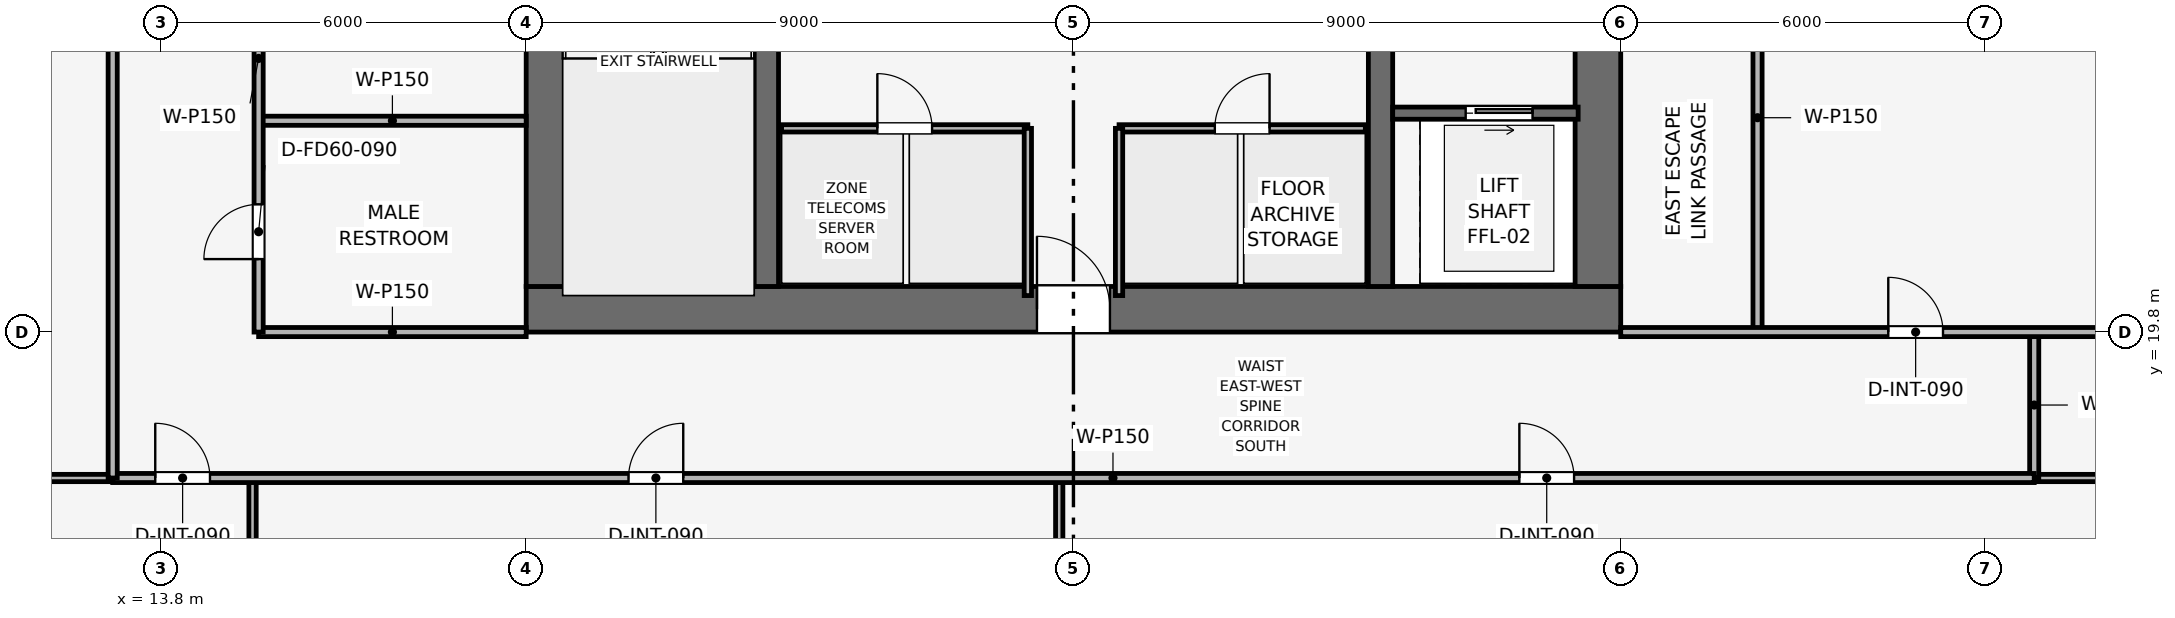
"""IFC4 building model, lengths in metres.
Left out: names, types, materials, properties, quantities, classifications, styles, units other than length and angle.
Written with IfcOpenShell. Run it as: python <this file> out.ifc"""

import sys

from ifc_helpers import new_model, si_unit, direction, frame, frame_2d, origin, place, context, subcontext, project, spatial, rectangle, extrude, element, fill, save


model = new_model("IFC4")
c1 = context("Model", 3, precision=1e-05, world=origin(), true_north=direction((0.0, 1.0)))
c2 = subcontext(c1, "Body", "Model", "MODEL_VIEW")
j1 = project(units=[si_unit("LENGTHUNIT", "METRE"), si_unit("PLANEANGLEUNIT", "RADIAN")], contexts=[c1])
p1 = place(None, origin())
s1 = spatial("IfcSite", under=j1, at=p1, CompositionType="ELEMENT")
p2 = place(p1, origin())
s2 = spatial("IfcBuilding", under=s1, at=p2, CompositionType="ELEMENT")
p3 = place(p2, frame((0.0, 0.0, 211.2)))
s3 = spatial("IfcBuildingStorey", under=s2, at=p3, CompositionType="ELEMENT", Elevation=211.2)
p4 = place(p3, frame((19.8, 20.175, 0.0), z_axis=(0.0, 0.0, 1.0), x_axis=(1.0, 0.0, 0.0)))
e1 = element("IfcWall", 1, at=p4, inside=s3, PredefinedType="SHEAR", context=c2, shape_type="SweptSolid", body=[
    extrude(rectangle(XDim=18.0, YDim=0.75, at=frame_2d((9.0, 0.0))), origin(), (0.0, 0.0, 1.0), 3.75),
])
p5 = place(p4, frame((8.4, 0.0, 0.0)))
e2 = element("IfcOpeningElement", 2, at=p5, cuts=e1, PredefinedType="OPENING", context=c2, shape_type="SweptSolid", body=[
    extrude(rectangle(XDim=1.2, YDim=2.2, at=frame_2d((0.6, 1.1))), frame((0.0, 0.385, 0.0), z_axis=(0.0, -1.0, 0.0), x_axis=(1.0, 0.0, 0.0)), (0.0, 0.0, 1.0), 0.77),
])
p6 = place(p3, frame((20.175, 20.55, 0.0), z_axis=(0.0, 0.0, 1.0), x_axis=(0.0, 1.0, 0.0)))
e3 = element("IfcWall", 3, at=p6, inside=s3, PredefinedType="SHEAR", context=c2, shape_type="SweptSolid", body=[
    extrude(rectangle(XDim=16.5, YDim=0.75, at=frame_2d((8.25, 0.0))), origin(), (0.0, 0.0, 1.0), 3.75),
])
p7 = place(p6, frame((10.25, 0.0, 0.0)))
e4 = element("IfcOpeningElement", 4, at=p7, cuts=e3, PredefinedType="OPENING", context=c2, shape_type="SweptSolid", body=[
    extrude(rectangle(XDim=1.1, YDim=2.15, at=frame_2d((0.55, 1.075))), frame((0.0, 0.385, 0.0), z_axis=(0.0, -1.0, 0.0), x_axis=(1.0, 0.0, 0.0)), (0.0, 0.0, 1.0), 0.77),
])
p8 = place(p3, frame((37.425, 20.55, 0.0), z_axis=(0.0, 0.0, 1.0), x_axis=(0.0, 1.0, 0.0)))
e5 = element("IfcWall", 5, at=p8, inside=s3, PredefinedType="SHEAR", context=c2, shape_type="SweptSolid", body=[
    extrude(rectangle(XDim=16.5, YDim=0.75, at=frame_2d((8.25, 0.0))), origin(), (0.0, 0.0, 1.0), 3.75),
])
p9 = place(p8, frame((4.75, 0.0, 0.0)))
e6 = element("IfcOpeningElement", 6, at=p9, cuts=e5, PredefinedType="OPENING", context=c2, shape_type="SweptSolid", body=[
    extrude(rectangle(XDim=1.1, YDim=2.15, at=frame_2d((0.55, 1.075))), frame((0.0, 0.385, 0.0), z_axis=(0.0, -1.0, 0.0), x_axis=(1.0, 0.0, 0.0)), (0.0, 0.0, 1.0), 0.77),
])
for number, where, z_axis, x_axis in (
    (7, (23.75, 20.55, 0.0), (0.0, 0.0, 1.0), (0.0, 1.0, 0.0)),
    (8, (33.85, 20.55, 0.0), (0.0, 0.0, 1.0), (0.0, 1.0, 0.0)),
):
    element("IfcWall", number, at=place(p3, frame(where, z_axis=z_axis, x_axis=x_axis)), inside=s3, PredefinedType="SHEAR", context=c2, shape_type="SweptSolid", body=[
        extrude(rectangle(XDim=16.5, YDim=0.4, at=frame_2d((8.25, 0.0))), origin(), (0.0, 0.0, 1.0), 3.75),
    ])
p10 = place(p3, frame((34.05, 23.4, 0.0), z_axis=(0.0, 0.0, 1.0), x_axis=(1.0, 0.0, 0.0)))
e9 = element("IfcWall", 9, at=p10, inside=s3, PredefinedType="SHEAR", context=c2, shape_type="SweptSolid", body=[
    extrude(rectangle(XDim=3.05, YDim=0.2, at=frame_2d((1.525, 0.0))), origin(), (0.0, 0.0, 1.0), 3.5),
])
p11 = place(p10, frame((1.2, 0.0, 0.0)))
e10 = element("IfcOpeningElement", 10, at=p11, cuts=e9, PredefinedType="OPENING", context=c2, shape_type="SweptSolid", body=[
    extrude(rectangle(XDim=1.1, YDim=2.15, at=frame_2d((0.55, 1.075))), frame((0.0, 0.11, 0.0), z_axis=(0.0, -1.0, 0.0), x_axis=(1.0, 0.0, 0.0)), (0.0, 0.0, 1.0), 0.22),
])
p12 = place(p3, frame((24.0, 23.15, 0.0), z_axis=(0.0, 0.0, 1.0), x_axis=(1.0, 0.0, 0.0)))
e11 = element("IfcWall", 11, at=p12, inside=s3, PredefinedType="PARTITIONING", context=c2, shape_type="SweptSolid", body=[
    extrude(rectangle(XDim=4.05, YDim=0.12, at=frame_2d((2.025, 0.0))), origin(), (0.0, 0.0, 1.0), 3.5),
])
p13 = place(p12, frame((1.575, 0.0, 0.0)))
e12 = element("IfcOpeningElement", 12, at=p13, cuts=e11, PredefinedType="OPENING", context=c2, shape_type="SweptSolid", body=[
    extrude(rectangle(XDim=0.9, YDim=2.1, at=frame_2d((0.45, 1.05))), frame((0.0, 0.07, 0.0), z_axis=(0.0, -1.0, 0.0), x_axis=(1.0, 0.0, 0.0)), (0.0, 0.0, 1.0), 0.14),
])
p14 = place(p3, frame((28.05, 20.4, 0.0), z_axis=(0.0, 0.0, 1.0), x_axis=(0.0, 1.0, 0.0)))
e13 = element("IfcWall", 13, at=p14, inside=s3, PredefinedType="PARTITIONING", context=c2, shape_type="SweptSolid", body=[
    extrude(rectangle(XDim=2.75, YDim=0.12, at=frame_2d((1.375, 0.0))), origin(), (0.0, 0.0, 1.0), 3.5),
])
p15 = place(p3, frame((29.55, 23.15, 0.0), z_axis=(0.0, 0.0, 1.0), x_axis=(1.0, 0.0, 0.0)))
e14 = element("IfcWall", 14, at=p15, inside=s3, PredefinedType="PARTITIONING", context=c2, shape_type="SweptSolid", body=[
    extrude(rectangle(XDim=4.05, YDim=0.12, at=frame_2d((2.025, 0.0))), origin(), (0.0, 0.0, 1.0), 3.5),
])
p16 = place(p15, frame((1.575, 0.0, 0.0)))
e15 = element("IfcOpeningElement", 15, at=p16, cuts=e14, PredefinedType="OPENING", context=c2, shape_type="SweptSolid", body=[
    extrude(rectangle(XDim=0.9, YDim=2.1, at=frame_2d((0.45, 1.05))), frame((0.0, 0.07, 0.0), z_axis=(0.0, -1.0, 0.0), x_axis=(1.0, 0.0, 0.0)), (0.0, 0.0, 1.0), 0.14),
])
p17 = place(p3, frame((29.55, 20.4, 0.0), z_axis=(0.0, 0.0, 1.0), x_axis=(0.0, 1.0, 0.0)))
e16 = element("IfcWall", 16, at=p17, inside=s3, PredefinedType="PARTITIONING", context=c2, shape_type="SweptSolid", body=[
    extrude(rectangle(XDim=2.75, YDim=0.12, at=frame_2d((1.375, 0.0))), origin(), (0.0, 0.0, 1.0), 3.5),
])
p18 = place(p3, frame((15.4, 19.8, 0.0), z_axis=(0.0, 0.0, 1.0), x_axis=(1.0, 0.0, 0.0)))
e17 = element("IfcWall", 17, at=p18, inside=s3, PredefinedType="PARTITIONING", context=c2, shape_type="SweptSolid", body=[
    extrude(rectangle(XDim=4.4, YDim=0.15, at=frame_2d((2.2, 0.0))), origin(), (0.0, 0.0, 1.0), 3.035),
])
p19 = place(p3, frame((15.4, 23.275, 0.0), z_axis=(0.0, 0.0, 1.0), x_axis=(1.0, 0.0, 0.0)))
e18 = element("IfcWall", 18, at=p19, inside=s3, PredefinedType="PARTITIONING", context=c2, shape_type="SweptSolid", body=[
    extrude(rectangle(XDim=4.4, YDim=0.15, at=frame_2d((2.2, 0.0))), origin(), (0.0, 0.0, 1.0), 3.5),
])
p20 = place(p3, frame((15.4, 19.8, 0.0), z_axis=(0.0, 0.0, 1.0), x_axis=(0.0, 1.0, 0.0)))
e19 = element("IfcWall", 19, at=p20, inside=s3, PredefinedType="PARTITIONING", context=c2, shape_type="SweptSolid", body=[
    extrude(rectangle(XDim=10.35, YDim=0.15, at=frame_2d((5.175, 0.0))), origin(), (0.0, 0.0, 1.0), 3.035),
])
p21 = place(p20, frame((1.2, 0.0, 0.0)))
e20 = element("IfcOpeningElement", 20, at=p21, cuts=e19, PredefinedType="OPENING", context=c2, shape_type="SweptSolid", body=[
    extrude(rectangle(XDim=0.9, YDim=2.1, at=frame_2d((0.45, 1.05))), frame((0.0, 0.085, 0.0), z_axis=(0.0, -1.0, 0.0), x_axis=(1.0, 0.0, 0.0)), (0.0, 0.0, 1.0), 0.17),
])
p22 = place(p20, frame((4.7, 0.0, 0.0)))
e21 = element("IfcOpeningElement", 21, at=p22, cuts=e19, PredefinedType="OPENING", context=c2, shape_type="SweptSolid", body=[
    extrude(rectangle(XDim=0.9, YDim=2.1, at=frame_2d((0.45, 1.05))), frame((0.0, 0.085, 0.0), z_axis=(0.0, -1.0, 0.0), x_axis=(1.0, 0.0, 0.0)), (0.0, 0.0, 1.0), 0.17),
])
p23 = place(p20, frame((8.1, 0.0, 0.0)))
e22 = element("IfcOpeningElement", 22, at=p23, cuts=e19, PredefinedType="OPENING", context=c2, shape_type="SweptSolid", body=[
    extrude(rectangle(XDim=0.95, YDim=2.1, at=frame_2d((0.475, 1.05))), frame((0.0, 0.085, 0.0), z_axis=(0.0, -1.0, 0.0), x_axis=(1.0, 0.0, 0.0)), (0.0, 0.0, 1.0), 0.17),
])
p24 = place(p3, frame((40.05, 19.8, 0.0), z_axis=(0.0, 0.0, 1.0), x_axis=(0.0, 1.0, 0.0)))
e23 = element("IfcWall", 23, at=p24, inside=s3, PredefinedType="PARTITIONING", context=c2, shape_type="SweptSolid", body=[
    extrude(rectangle(XDim=7.05, YDim=0.15, at=frame_2d((3.525, 0.0))), origin(), (0.0, 0.0, 1.0), 3.035),
])
for number, where, z_axis, x_axis in (
    (24, (15.3, 1.93, 0.0), (0.0, 0.0, 1.0), (0.0, 1.0, 0.0)),
    (25, (28.566, 1.93, 0.0), (0.0, 0.0, 1.0), (0.0, 1.0, 0.0)),
):
    element("IfcWall", number, at=place(p3, frame(where, z_axis=z_axis, x_axis=x_axis)), inside=s3, PredefinedType="PARTITIONING", context=c2, shape_type="SweptSolid", body=[
        extrude(rectangle(XDim=15.47, YDim=0.12, at=frame_2d((7.735, 0.0))), origin(), (0.0, 0.0, 1.0), 2.885),
    ])
p25 = place(p3, frame((1.93, 17.4, 0.0), z_axis=(0.0, 0.0, 1.0), x_axis=(1.0, 0.0, 0.0)))
e26 = element("IfcWall", 26, at=p25, inside=s3, PredefinedType="PARTITIONING", context=c2, shape_type="SweptSolid", body=[
    extrude(rectangle(XDim=11.07, YDim=0.12, at=frame_2d((5.535, 0.0))), origin(), (0.0, 0.0, 1.0), 2.885),
])
p26 = place(p3, frame((44.6, 17.4, 0.0), z_axis=(0.0, 0.0, 1.0), x_axis=(1.0, 0.0, 0.0)))
e27 = element("IfcWall", 27, at=p26, inside=s3, PredefinedType="PARTITIONING", context=c2, shape_type="SweptSolid", body=[
    extrude(rectangle(XDim=11.07, YDim=0.12, at=frame_2d((5.535, 0.0))), origin(), (0.0, 0.0, 1.0), 2.885),
])
p27 = place(p3, frame((44.6, 17.4, 0.0), z_axis=(0.0, 0.0, 1.0), x_axis=(0.0, 1.0, 0.0)))
e28 = element("IfcWall", 28, at=p27, inside=s3, PredefinedType="PARTITIONING", context=c2, shape_type="SweptSolid", body=[
    extrude(rectangle(XDim=2.4, YDim=0.15, at=frame_2d((1.2, 0.0))), origin(), (0.0, 0.0, 1.0), 3.5),
])
p28 = place(p3, frame((37.8, 19.8, 0.0), z_axis=(0.0, 0.0, 1.0), x_axis=(1.0, 0.0, 0.0)))
e29 = element("IfcWall", 29, at=p28, inside=s3, PredefinedType="PARTITIONING", context=c2, shape_type="SweptSolid", body=[
    extrude(rectangle(XDim=17.87, YDim=0.15, at=frame_2d((8.935, 0.0))), origin(), (0.0, 0.0, 1.0), 2.885),
])
p29 = place(p28, frame((4.4, 0.0, 0.0)))
e30 = element("IfcOpeningElement", 30, at=p29, cuts=e29, PredefinedType="OPENING", context=c2, shape_type="SweptSolid", body=[
    extrude(rectangle(XDim=0.9, YDim=2.1, at=frame_2d((0.45, 1.05))), frame((0.0, 0.085, 0.0), z_axis=(0.0, -1.0, 0.0), x_axis=(1.0, 0.0, 0.0)), (0.0, 0.0, 1.0), 0.17),
])
p30 = place(p3, frame((13.0, 17.4, 0.0), z_axis=(0.0, 0.0, 1.0), x_axis=(1.0, 0.0, 0.0)))
e31 = element("IfcWall", 31, at=p30, inside=s3, PredefinedType="PARTITIONING", context=c2, shape_type="SweptSolid", body=[
    extrude(rectangle(XDim=31.6, YDim=0.15, at=frame_2d((15.8, 0.0))), origin(), (0.0, 0.0, 1.0), 3.035),
])
p31 = place(p30, frame((0.7, 0.0, 0.0)))
e32 = element("IfcOpeningElement", 32, at=p31, cuts=e31, PredefinedType="OPENING", context=c2, shape_type="SweptSolid", body=[
    extrude(rectangle(XDim=0.9, YDim=2.1, at=frame_2d((0.45, 1.05))), frame((0.0, 0.085, 0.0), z_axis=(0.0, -1.0, 0.0), x_axis=(1.0, 0.0, 0.0)), (0.0, 0.0, 1.0), 0.17),
])
p32 = place(p30, frame((8.483, 0.0, 0.0)))
e33 = element("IfcOpeningElement", 33, at=p32, cuts=e31, PredefinedType="OPENING", context=c2, shape_type="SweptSolid", body=[
    extrude(rectangle(XDim=0.9, YDim=2.1, at=frame_2d((0.45, 1.05))), frame((0.0, 0.085, 0.0), z_axis=(0.0, -1.0, 0.0), x_axis=(1.0, 0.0, 0.0)), (0.0, 0.0, 1.0), 0.17),
])
p33 = place(p30, frame((23.133, 0.0, 0.0)))
e34 = element("IfcOpeningElement", 34, at=p33, cuts=e31, PredefinedType="OPENING", context=c2, shape_type="SweptSolid", body=[
    extrude(rectangle(XDim=0.9, YDim=2.1, at=frame_2d((0.45, 1.05))), frame((0.0, 0.085, 0.0), z_axis=(0.0, -1.0, 0.0), x_axis=(1.0, 0.0, 0.0)), (0.0, 0.0, 1.0), 0.17),
])
p34 = place(p3, frame((13.0, 17.4, 0.0), z_axis=(0.0, 0.0, 1.0), x_axis=(0.0, 1.0, 0.0)))
e35 = element("IfcWall", 35, at=p34, inside=s3, PredefinedType="PARTITIONING", context=c2, shape_type="SweptSolid", body=[
    extrude(rectangle(XDim=22.8, YDim=0.15, at=frame_2d((11.4, 0.0))), origin(), (0.0, 0.0, 1.0), 3.035),
])
p35 = place(p34, frame((10.95, 0.0, 0.0)))
e36 = element("IfcOpeningElement", 36, at=p35, cuts=e35, PredefinedType="OPENING", context=c2, shape_type="SweptSolid", body=[
    extrude(rectangle(XDim=0.9, YDim=2.1, at=frame_2d((0.45, 1.05))), frame((0.0, 0.085, 0.0), z_axis=(0.0, -1.0, 0.0), x_axis=(1.0, 0.0, 0.0)), (0.0, 0.0, 1.0), 0.17),
])
p36 = place(p11, origin())
e37 = element("IfcDoor", 37, at=p36, inside=s3, OperationType="SLIDING_TO_RIGHT", PredefinedType="DOOR", context=c2, shape_type="SweptSolid", body=[
    extrude(rectangle(XDim=1.1, YDim=2.15, at=frame_2d((0.55, 1.075))), frame((0.0, 0.025, 0.0), z_axis=(0.0, -1.0, 0.0), x_axis=(1.0, 0.0, 0.0)), (0.0, 0.0, 1.0), 0.05),
])
fill(e10, e37)
p37 = place(p13, origin())
e38 = element("IfcDoor", 38, at=p37, inside=s3, OperationType="SINGLE_SWING_LEFT", PredefinedType="DOOR", context=c2, shape_type="SweptSolid", body=[
    extrude(rectangle(XDim=0.9, YDim=2.1, at=frame_2d((0.45, 1.05))), frame((0.0, 0.025, 0.0), z_axis=(0.0, -1.0, 0.0), x_axis=(1.0, 0.0, 0.0)), (0.0, 0.0, 1.0), 0.05),
])
fill(e12, e38)
p38 = place(p16, origin())
e39 = element("IfcDoor", 39, at=p38, inside=s3, OperationType="SINGLE_SWING_RIGHT", PredefinedType="DOOR", context=c2, shape_type="SweptSolid", body=[
    extrude(rectangle(XDim=0.9, YDim=2.1, at=frame_2d((0.45, 1.05))), frame((0.0, 0.025, 0.0), z_axis=(0.0, -1.0, 0.0), x_axis=(1.0, 0.0, 0.0)), (0.0, 0.0, 1.0), 0.05),
])
fill(e15, e39)
p39 = place(p21, origin())
e40 = element("IfcDoor", 40, at=p39, inside=s3, OperationType="SINGLE_SWING_LEFT", PredefinedType="DOOR", context=c2, shape_type="SweptSolid", body=[
    extrude(rectangle(XDim=0.9, YDim=2.1, at=frame_2d((0.45, 1.05))), frame((0.0, 0.025, 0.0), z_axis=(0.0, -1.0, 0.0), x_axis=(1.0, 0.0, 0.0)), (0.0, 0.0, 1.0), 0.05),
])
fill(e20, e40)
p40 = place(p29, origin())
e41 = element("IfcDoor", 41, at=p40, inside=s3, OperationType="SINGLE_SWING_LEFT", PredefinedType="DOOR", context=c2, shape_type="SweptSolid", body=[
    extrude(rectangle(XDim=0.9, YDim=2.1, at=frame_2d((0.45, 1.05))), frame((0.0, 0.025, 0.0), z_axis=(0.0, -1.0, 0.0), x_axis=(1.0, 0.0, 0.0)), (0.0, 0.0, 1.0), 0.05),
])
fill(e30, e41)
p41 = place(p31, origin())
e42 = element("IfcDoor", 42, at=p41, inside=s3, OperationType="SINGLE_SWING_LEFT", PredefinedType="DOOR", context=c2, shape_type="SweptSolid", body=[
    extrude(rectangle(XDim=0.9, YDim=2.1, at=frame_2d((0.45, 1.05))), frame((0.0, 0.025, 0.0), z_axis=(0.0, -1.0, 0.0), x_axis=(1.0, 0.0, 0.0)), (0.0, 0.0, 1.0), 0.05),
])
fill(e32, e42)
p42 = place(p32, origin())
e43 = element("IfcDoor", 43, at=p42, inside=s3, OperationType="SINGLE_SWING_RIGHT", PredefinedType="DOOR", context=c2, shape_type="SweptSolid", body=[
    extrude(rectangle(XDim=0.9, YDim=2.1, at=frame_2d((0.45, 1.05))), frame((0.0, 0.025, 0.0), z_axis=(0.0, -1.0, 0.0), x_axis=(1.0, 0.0, 0.0)), (0.0, 0.0, 1.0), 0.05),
])
fill(e33, e43)
p43 = place(p33, origin())
e44 = element("IfcDoor", 44, at=p43, inside=s3, OperationType="SINGLE_SWING_LEFT", PredefinedType="DOOR", context=c2, shape_type="SweptSolid", body=[
    extrude(rectangle(XDim=0.9, YDim=2.1, at=frame_2d((0.45, 1.05))), frame((0.0, 0.025, 0.0), z_axis=(0.0, -1.0, 0.0), x_axis=(1.0, 0.0, 0.0)), (0.0, 0.0, 1.0), 0.05),
])
fill(e34, e44)
p44 = place(p5, origin())
e45 = element("IfcDoor", 45, at=p44, inside=s3, OperationType="SINGLE_SWING_LEFT", PredefinedType="DOOR", context=c2, shape_type="SweptSolid", body=[
    extrude(rectangle(XDim=1.2, YDim=2.2, at=frame_2d((0.6, 1.1))), frame((0.0, 0.025, 0.0), z_axis=(0.0, -1.0, 0.0), x_axis=(1.0, 0.0, 0.0)), (0.0, 0.0, 1.0), 0.05),
])
fill(e2, e45)
save(model, sys.argv[1])
